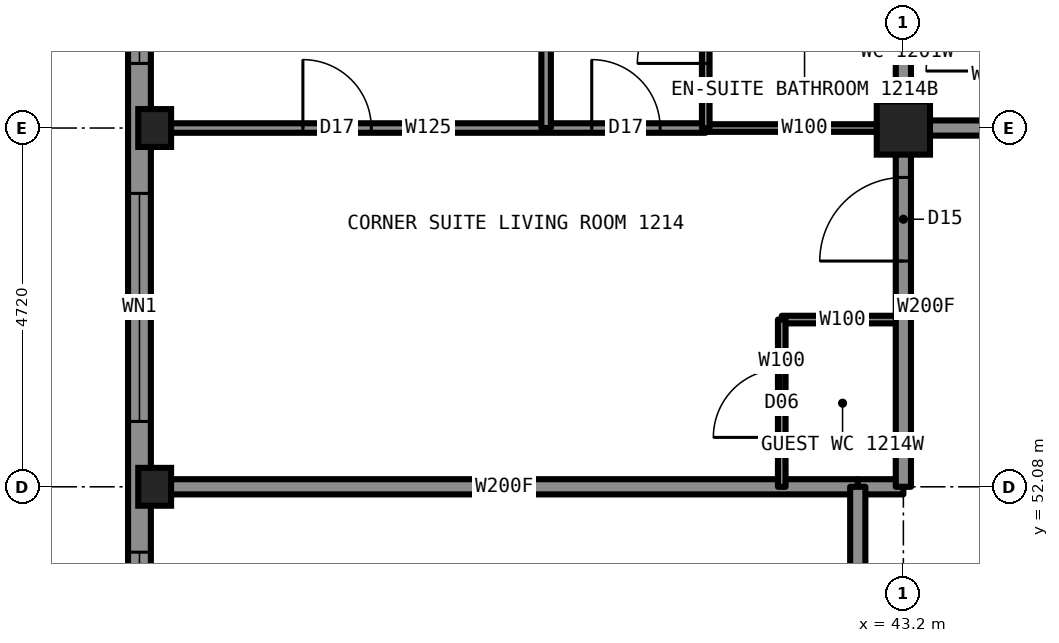
"""IFC4 building model, lengths in metres.
Left out: names, types, materials, properties, quantities, classifications, styles, units other than length and angle.
Written with IfcOpenShell. Run it as: python <this file> out.ifc"""

import sys

from ifc_helpers import new_model, si_unit, direction, frame, frame_2d, origin, origin_2d, place, context, subcontext, project, spatial, rectangle, hollow_rectangle, i_section, extrude, element, fill, save


model = new_model("IFC4")
c1 = context("Model", 3, precision=1e-05, world=origin(), true_north=direction((0.0, 1.0)))
c2 = subcontext(c1, "Body", "Model", "MODEL_VIEW")
j1 = project(units=[si_unit("LENGTHUNIT", "METRE"), si_unit("PLANEANGLEUNIT", "RADIAN")], contexts=[c1])
p1 = place(None, origin())
s1 = spatial("IfcSite", under=j1, at=p1, CompositionType="ELEMENT")
p2 = place(p1, origin())
s2 = spatial("IfcBuilding", under=s1, at=p2, CompositionType="ELEMENT")
p3 = place(p2, frame((0.0, 0.0, 49.5)))
s3 = spatial("IfcBuildingStorey", under=s2, at=p3, CompositionType="ELEMENT", Elevation=49.5)
for number, where, z_axis, x_axis in (
    (1, (33.35, 52.08, 0.0), (0.0, 0.0, 1.0), (1.0, 0.0, 0.0)),
    (2, (33.35, 56.8, 0.0), (0.0, 0.0, 1.0), (1.0, 0.0, 0.0)),
):
    element("IfcColumn", number, at=place(p3, frame(where, z_axis=z_axis, x_axis=x_axis)), inside=s3, PredefinedType="COLUMN", context=c2, shape_type="SweptSolid", body=[
        extrude(i_section(OverallWidth=0.432, OverallDepth=0.498, WebThickness=0.056, FlangeThickness=0.089, at=origin_2d()), origin(), (0.0, 0.0, 1.0), 3.5),
    ])
p4 = place(p3, frame((43.2, 56.8, 0.0), z_axis=(0.0, 0.0, 1.0), x_axis=(1.0, 0.0, 0.0)))
e3 = element("IfcColumn", 3, at=p4, inside=s3, PredefinedType="COLUMN", context=c2, shape_type="SweptSolid", body=[
    extrude(hollow_rectangle(XDim=0.7, YDim=0.7, WallThickness=0.06, at=origin_2d()), origin(), (0.0, 0.0, 1.0), 3.5),
])
p5 = place(p3, frame((40.6, 56.8, 0.0), z_axis=(0.0, 0.0, 1.0), x_axis=(1.0, 0.0, 0.0)))
e4 = element("IfcWall", 4, at=p5, inside=s3, PredefinedType="PARTITIONING", context=c2, shape_type="SweptSolid", body=[
    extrude(rectangle(XDim=2.6, YDim=0.1, at=frame_2d((1.3, 0.0))), origin(), (0.0, 0.0, 1.0), 2.573),
])
p6 = place(p3, frame((43.2, 56.8, 0.0), z_axis=(0.0, 0.0, 1.0), x_axis=(1.0, 0.0, 0.0)))
e5 = element("IfcWall", 5, at=p6, inside=s3, PredefinedType="PARTITIONING", context=c2, shape_type="SweptSolid", body=[
    extrude(rectangle(XDim=23.6, YDim=0.2, at=frame_2d((11.8, 0.0))), origin(), (0.0, 0.0, 1.0), 3.33),
])
p7 = place(p6, frame((1.46, 0.0, 0.0)))
e6 = element("IfcOpeningElement", 6, at=p7, cuts=e5, PredefinedType="OPENING", context=c2, shape_type="SweptSolid", body=[
    extrude(rectangle(XDim=1.0, YDim=2.2, at=frame_2d((0.5, 1.1))), frame((0.0, 0.11, 0.0), z_axis=(0.0, -1.0, 0.0), x_axis=(1.0, 0.0, 0.0)), (0.0, 0.0, 1.0), 0.22),
])
p8 = place(p6, frame((7.27, 0.0, 0.0)))
e7 = element("IfcOpeningElement", 7, at=p8, cuts=e5, PredefinedType="OPENING", context=c2, shape_type="SweptSolid", body=[
    extrude(rectangle(XDim=1.0, YDim=2.2, at=frame_2d((0.5, 1.1))), frame((0.0, 0.11, 0.0), z_axis=(0.0, -1.0, 0.0), x_axis=(1.0, 0.0, 0.0)), (0.0, 0.0, 1.0), 0.22),
])
p9 = place(p6, frame((11.7, 0.0, 0.0)))
e8 = element("IfcOpeningElement", 8, at=p9, cuts=e5, PredefinedType="OPENING", context=c2, shape_type="SweptSolid", body=[
    extrude(rectangle(XDim=1.0, YDim=2.2, at=frame_2d((0.5, 1.1))), frame((0.0, 0.11, 0.0), z_axis=(0.0, -1.0, 0.0), x_axis=(1.0, 0.0, 0.0)), (0.0, 0.0, 1.0), 0.22),
])
p10 = place(p6, frame((17.16, 0.0, 0.0)))
e9 = element("IfcOpeningElement", 9, at=p10, cuts=e5, PredefinedType="OPENING", context=c2, shape_type="SweptSolid", body=[
    extrude(rectangle(XDim=1.0, YDim=2.2, at=frame_2d((0.5, 1.1))), frame((0.0, 0.11, 0.0), z_axis=(0.0, -1.0, 0.0), x_axis=(1.0, 0.0, 0.0)), (0.0, 0.0, 1.0), 0.22),
])
p11 = place(p3, frame((33.3, 56.8, 0.0), z_axis=(0.0, 0.0, 1.0), x_axis=(1.0, 0.0, 0.0)))
e10 = element("IfcWall", 10, at=p11, inside=s3, PredefinedType="PARTITIONING", context=c2, shape_type="SweptSolid", body=[
    extrude(rectangle(XDim=7.3, YDim=0.125, at=frame_2d((3.65, 0.0))), origin(), (0.0, 0.0, 1.0), 2.573),
])
p12 = place(p11, frame((5.8, 0.0, 0.0)))
e11 = element("IfcOpeningElement", 11, at=p12, cuts=e10, PredefinedType="OPENING", context=c2, shape_type="SweptSolid", body=[
    extrude(rectangle(XDim=0.9, YDim=2.2, at=frame_2d((0.45, 1.1))), frame((0.0, 0.073, 0.0), z_axis=(0.0, -1.0, 0.0), x_axis=(1.0, 0.0, 0.0)), (0.0, 0.0, 1.0), 0.145),
])
p13 = place(p11, frame((2.0, 0.0, 0.0)))
e12 = element("IfcOpeningElement", 12, at=p13, cuts=e10, PredefinedType="OPENING", context=c2, shape_type="SweptSolid", body=[
    extrude(rectangle(XDim=0.9, YDim=2.2, at=frame_2d((0.45, 1.1))), frame((0.0, 0.073, 0.0), z_axis=(0.0, -1.0, 0.0), x_axis=(1.0, 0.0, 0.0)), (0.0, 0.0, 1.0), 0.145),
])
p14 = place(p3, frame((42.6, 52.08, 0.0), z_axis=(0.0, 0.0, 1.0), x_axis=(1.0, 0.0, 0.0)))
e13 = element("IfcWall", 13, at=p14, inside=s3, PredefinedType="PARTITIONING", context=c2, shape_type="SweptSolid", body=[
    extrude(rectangle(XDim=0.6, YDim=0.2, at=frame_2d((0.3, 0.0))), origin(), (0.0, 0.0, 1.0), 2.573),
])
p15 = place(p3, frame((33.3, 52.08, 0.0), z_axis=(0.0, 0.0, 1.0), x_axis=(1.0, 0.0, 0.0)))
e14 = element("IfcWall", 14, at=p15, inside=s3, PredefinedType="PARTITIONING", context=c2, shape_type="SweptSolid", body=[
    extrude(rectangle(XDim=9.3, YDim=0.2, at=frame_2d((4.65, 0.0))), origin(), (0.0, 0.0, 1.0), 2.573),
])
p16 = place(p3, frame((41.6, 54.28, 0.0), z_axis=(0.0, 0.0, 1.0), x_axis=(1.0, 0.0, 0.0)))
e15 = element("IfcWall", 15, at=p16, inside=s3, PredefinedType="PARTITIONING", context=c2, shape_type="SweptSolid", body=[
    extrude(rectangle(XDim=1.6, YDim=0.1, at=frame_2d((0.8, 0.0))), origin(), (0.0, 0.0, 1.0), 2.723),
])
p17 = place(p3, frame((43.2, 52.08, 0.0), z_axis=(0.0, 0.0, 1.0), x_axis=(0.0, 1.0, 0.0)))
e16 = element("IfcWall", 16, at=p17, inside=s3, PredefinedType="PARTITIONING", context=c2, shape_type="SweptSolid", body=[
    extrude(rectangle(XDim=4.72, YDim=0.2, at=frame_2d((2.36, 0.0))), origin(), (0.0, 0.0, 1.0), 3.33),
])
p18 = place(p17, frame((2.97, 0.0, 0.0)))
e17 = element("IfcOpeningElement", 17, at=p18, cuts=e16, PredefinedType="OPENING", context=c2, shape_type="SweptSolid", body=[
    extrude(rectangle(XDim=1.1, YDim=2.2, at=frame_2d((0.55, 1.1))), frame((0.0, 0.11, 0.0), z_axis=(0.0, -1.0, 0.0), x_axis=(1.0, 0.0, 0.0)), (0.0, 0.0, 1.0), 0.22),
])
p19 = place(p3, frame((43.2, 56.8, 0.0), z_axis=(0.0, 0.0, 1.0), x_axis=(0.0, 1.0, 0.0)))
e18 = element("IfcWall", 18, at=p19, inside=s3, PredefinedType="PARTITIONING", context=c2, shape_type="SweptSolid", body=[
    extrude(rectangle(XDim=9.9, YDim=0.2, at=frame_2d((4.95, 0.0))), origin(), (0.0, 0.0, 1.0), 2.573),
])
p20 = place(p3, frame((42.6, 37.92, 0.0), z_axis=(0.0, 0.0, 1.0), x_axis=(0.0, 1.0, 0.0)))
e19 = element("IfcWall", 19, at=p20, inside=s3, PredefinedType="PARTITIONING", context=c2, shape_type="SweptSolid", body=[
    extrude(rectangle(XDim=14.16, YDim=0.2, at=frame_2d((7.08, 0.0))), origin(), (0.0, 0.0, 1.0), 3.33),
])
p21 = place(p20, frame((2.55, 0.0, 0.0)))
e20 = element("IfcOpeningElement", 20, at=p21, cuts=e19, PredefinedType="OPENING", context=c2, shape_type="SweptSolid", body=[
    extrude(rectangle(XDim=1.0, YDim=2.2, at=frame_2d((0.5, 1.1))), frame((0.0, 0.11, 0.0), z_axis=(0.0, -1.0, 0.0), x_axis=(1.0, 0.0, 0.0)), (0.0, 0.0, 1.0), 0.22),
])
p22 = place(p20, frame((6.18, 0.0, 0.0)))
e21 = element("IfcOpeningElement", 21, at=p22, cuts=e19, PredefinedType="OPENING", context=c2, shape_type="SweptSolid", body=[
    extrude(rectangle(XDim=1.0, YDim=2.2, at=frame_2d((0.5, 1.1))), frame((0.0, 0.11, 0.0), z_axis=(0.0, -1.0, 0.0), x_axis=(1.0, 0.0, 0.0)), (0.0, 0.0, 1.0), 0.22),
])
p23 = place(p20, frame((11.99, 0.0, 0.0)))
e22 = element("IfcOpeningElement", 22, at=p23, cuts=e19, PredefinedType="OPENING", context=c2, shape_type="SweptSolid", body=[
    extrude(rectangle(XDim=1.0, YDim=2.2, at=frame_2d((0.5, 1.1))), frame((0.0, 0.11, 0.0), z_axis=(0.0, -1.0, 0.0), x_axis=(1.0, 0.0, 0.0)), (0.0, 0.0, 1.0), 0.22),
])
p24 = place(p3, frame((41.6, 52.08, 0.0), z_axis=(0.0, 0.0, 1.0), x_axis=(0.0, 1.0, 0.0)))
e23 = element("IfcWall", 23, at=p24, inside=s3, PredefinedType="PARTITIONING", context=c2, shape_type="SweptSolid", body=[
    extrude(rectangle(XDim=2.2, YDim=0.1, at=frame_2d((1.1, 0.0))), origin(), (0.0, 0.0, 1.0), 3.33),
])
p25 = place(p24, frame((0.65, 0.0, 0.0)))
e24 = element("IfcOpeningElement", 24, at=p25, cuts=e23, PredefinedType="OPENING", context=c2, shape_type="SweptSolid", body=[
    extrude(rectangle(XDim=0.9, YDim=2.1, at=frame_2d((0.45, 1.05))), frame((0.0, 0.06, 0.0), z_axis=(0.0, -1.0, 0.0), x_axis=(1.0, 0.0, 0.0)), (0.0, 0.0, 1.0), 0.12),
])
p26 = place(p3, frame((40.6, 56.8, 0.0), z_axis=(0.0, 0.0, 1.0), x_axis=(0.0, 1.0, 0.0)))
e25 = element("IfcWall", 25, at=p26, inside=s3, PredefinedType="PARTITIONING", context=c2, shape_type="SweptSolid", body=[
    extrude(rectangle(XDim=2.6, YDim=0.1, at=frame_2d((1.3, 0.0))), origin(), (0.0, 0.0, 1.0), 3.33),
])
p27 = place(p26, frame((0.85, 0.0, 0.0)))
e26 = element("IfcOpeningElement", 26, at=p27, cuts=e25, PredefinedType="OPENING", context=c2, shape_type="SweptSolid", body=[
    extrude(rectangle(XDim=0.9, YDim=2.1, at=frame_2d((0.45, 1.05))), frame((0.0, 0.06, 0.0), z_axis=(0.0, -1.0, 0.0), x_axis=(1.0, 0.0, 0.0)), (0.0, 0.0, 1.0), 0.12),
])
p28 = place(p3, frame((38.5, 56.8, 0.0), z_axis=(0.0, 0.0, 1.0), x_axis=(0.0, 1.0, 0.0)))
e27 = element("IfcWall", 27, at=p28, inside=s3, PredefinedType="PARTITIONING", context=c2, shape_type="SweptSolid", body=[
    extrude(rectangle(XDim=9.894, YDim=0.125, at=frame_2d((4.947, 0.0))), origin(), (0.0, 0.0, 1.0), 3.33),
])
p29 = place(p3, frame((33.15, 61.5, 0.0), z_axis=(0.0, 0.0, 1.0), x_axis=(0.0, -1.0, 0.0)))
e28 = element("IfcWall", 28, at=p29, inside=s3, PredefinedType="SOLIDWALL", context=c2, shape_type="SweptSolid", body=[
    extrude(rectangle(XDim=33.0, YDim=0.3, at=frame_2d((16.5, 0.0))), origin(), (0.0, 0.0, 1.0), 2.83),
])
p30 = place(p29, frame((0.85, 0.0, 0.5)))
e29 = element("IfcOpeningElement", 29, at=p30, cuts=e28, PredefinedType="OPENING", context=c2, shape_type="SweptSolid", body=[
    extrude(rectangle(XDim=3.0, YDim=2.0, at=frame_2d((1.5, 1.0))), frame((0.0, 0.16, 0.0), z_axis=(0.0, -1.0, 0.0), x_axis=(1.0, 0.0, 0.0)), (0.0, 0.0, 1.0), 0.32),
])
p31 = place(p29, frame((5.56, 0.0, 0.5)))
e30 = element("IfcOpeningElement", 30, at=p31, cuts=e28, PredefinedType="OPENING", context=c2, shape_type="SweptSolid", body=[
    extrude(rectangle(XDim=3.0, YDim=2.0, at=frame_2d((1.5, 1.0))), frame((0.0, 0.16, 0.0), z_axis=(0.0, -1.0, 0.0), x_axis=(1.0, 0.0, 0.0)), (0.0, 0.0, 1.0), 0.32),
])
p32 = place(p29, frame((10.28, 0.0, 1.1)))
e31 = element("IfcOpeningElement", 31, at=p32, cuts=e28, PredefinedType="OPENING", context=c2, shape_type="SweptSolid", body=[
    extrude(rectangle(XDim=1.1, YDim=1.4, at=frame_2d((0.55, 0.7))), frame((0.0, 0.16, 0.0), z_axis=(0.0, -1.0, 0.0), x_axis=(1.0, 0.0, 0.0)), (0.0, 0.0, 1.0), 0.32),
])
p33 = place(p29, frame((15.0, 0.0, 0.5)))
e32 = element("IfcOpeningElement", 32, at=p33, cuts=e28, PredefinedType="OPENING", context=c2, shape_type="SweptSolid", body=[
    extrude(rectangle(XDim=3.0, YDim=2.0, at=frame_2d((1.5, 1.0))), frame((0.0, 0.16, 0.0), z_axis=(0.0, -1.0, 0.0), x_axis=(1.0, 0.0, 0.0)), (0.0, 0.0, 1.0), 0.32),
])
p34 = place(p29, frame((21.62, 0.0, 1.1)))
e33 = element("IfcOpeningElement", 33, at=p34, cuts=e28, PredefinedType="OPENING", context=c2, shape_type="SweptSolid", body=[
    extrude(rectangle(XDim=1.1, YDim=1.4, at=frame_2d((0.55, 0.7))), frame((0.0, 0.16, 0.0), z_axis=(0.0, -1.0, 0.0), x_axis=(1.0, 0.0, 0.0)), (0.0, 0.0, 1.0), 0.32),
])
p35 = place(p29, frame((24.44, 0.0, 0.5)))
e34 = element("IfcOpeningElement", 34, at=p35, cuts=e28, PredefinedType="OPENING", context=c2, shape_type="SweptSolid", body=[
    extrude(rectangle(XDim=3.0, YDim=2.0, at=frame_2d((1.5, 1.0))), frame((0.0, 0.16, 0.0), z_axis=(0.0, -1.0, 0.0), x_axis=(1.0, 0.0, 0.0)), (0.0, 0.0, 1.0), 0.32),
])
p36 = place(p29, frame((29.15, 0.0, 0.5)))
e35 = element("IfcOpeningElement", 35, at=p36, cuts=e28, PredefinedType="OPENING", context=c2, shape_type="SweptSolid", body=[
    extrude(rectangle(XDim=3.0, YDim=2.0, at=frame_2d((1.5, 1.0))), frame((0.0, 0.16, 0.0), z_axis=(0.0, -1.0, 0.0), x_axis=(1.0, 0.0, 0.0)), (0.0, 0.0, 1.0), 0.32),
])
p37 = place(p18, origin())
e36 = element("IfcDoor", 36, at=p37, inside=s3, OperationType="SINGLE_SWING_LEFT", PredefinedType="DOOR", context=c2, shape_type="SweptSolid", body=[
    extrude(rectangle(XDim=1.1, YDim=2.2, at=frame_2d((0.55, 1.1))), frame((0.0, 0.025, 0.0), z_axis=(0.0, -1.0, 0.0), x_axis=(1.0, 0.0, 0.0)), (0.0, 0.0, 1.0), 0.05),
])
fill(e17, e36)
p38 = place(p27, origin())
e37 = element("IfcDoor", 37, at=p38, inside=s3, OperationType="SINGLE_SWING_RIGHT", PredefinedType="DOOR", context=c2, shape_type="SweptSolid", body=[
    extrude(rectangle(XDim=0.9, YDim=2.1, at=frame_2d((0.45, 1.05))), frame((0.0, 0.025, 0.0), z_axis=(0.0, -1.0, 0.0), x_axis=(1.0, 0.0, 0.0)), (0.0, 0.0, 1.0), 0.05),
])
fill(e26, e37)
p39 = place(p12, origin())
e38 = element("IfcDoor", 38, at=p39, inside=s3, OperationType="SINGLE_SWING_LEFT", PredefinedType="DOOR", context=c2, shape_type="SweptSolid", body=[
    extrude(rectangle(XDim=0.9, YDim=2.2, at=frame_2d((0.45, 1.1))), frame((0.0, 0.025, 0.0), z_axis=(0.0, -1.0, 0.0), x_axis=(1.0, 0.0, 0.0)), (0.0, 0.0, 1.0), 0.05),
])
fill(e11, e38)
p40 = place(p13, origin())
e39 = element("IfcDoor", 39, at=p40, inside=s3, OperationType="SINGLE_SWING_LEFT", PredefinedType="DOOR", context=c2, shape_type="SweptSolid", body=[
    extrude(rectangle(XDim=0.9, YDim=2.2, at=frame_2d((0.45, 1.1))), frame((0.0, 0.025, 0.0), z_axis=(0.0, -1.0, 0.0), x_axis=(1.0, 0.0, 0.0)), (0.0, 0.0, 1.0), 0.05),
])
fill(e12, e39)
p41 = place(p25, origin())
e40 = element("IfcDoor", 40, at=p41, inside=s3, OperationType="SINGLE_SWING_LEFT", PredefinedType="DOOR", context=c2, shape_type="SweptSolid", body=[
    extrude(rectangle(XDim=0.9, YDim=2.1, at=frame_2d((0.45, 1.05))), frame((0.0, 0.025, 0.0), z_axis=(0.0, -1.0, 0.0), x_axis=(1.0, 0.0, 0.0)), (0.0, 0.0, 1.0), 0.05),
])
fill(e24, e40)
p42 = place(p30, origin())
e41 = element("IfcWindow", 41, at=p42, inside=s3, PartitioningType="SINGLE_PANEL", PredefinedType="WINDOW", context=c2, shape_type="SweptSolid", body=[
    extrude(rectangle(XDim=3.0, YDim=2.0, at=frame_2d((1.5, 1.0))), frame((0.0, 0.03, 0.0), z_axis=(0.0, -1.0, 0.0), x_axis=(1.0, 0.0, 0.0)), (0.0, 0.0, 1.0), 0.06),
])
fill(e29, e41)
p43 = place(p31, origin())
e42 = element("IfcWindow", 42, at=p43, inside=s3, PartitioningType="SINGLE_PANEL", PredefinedType="WINDOW", context=c2, shape_type="SweptSolid", body=[
    extrude(rectangle(XDim=3.0, YDim=2.0, at=frame_2d((1.5, 1.0))), frame((0.0, 0.03, 0.0), z_axis=(0.0, -1.0, 0.0), x_axis=(1.0, 0.0, 0.0)), (0.0, 0.0, 1.0), 0.06),
])
fill(e30, e42)
p44 = place(p32, origin())
e43 = element("IfcWindow", 43, at=p44, inside=s3, PartitioningType="SINGLE_PANEL", PredefinedType="WINDOW", context=c2, shape_type="SweptSolid", body=[
    extrude(rectangle(XDim=1.1, YDim=1.4, at=frame_2d((0.55, 0.7))), frame((0.0, 0.03, 0.0), z_axis=(0.0, -1.0, 0.0), x_axis=(1.0, 0.0, 0.0)), (0.0, 0.0, 1.0), 0.06),
])
fill(e31, e43)
save(model, sys.argv[1])
